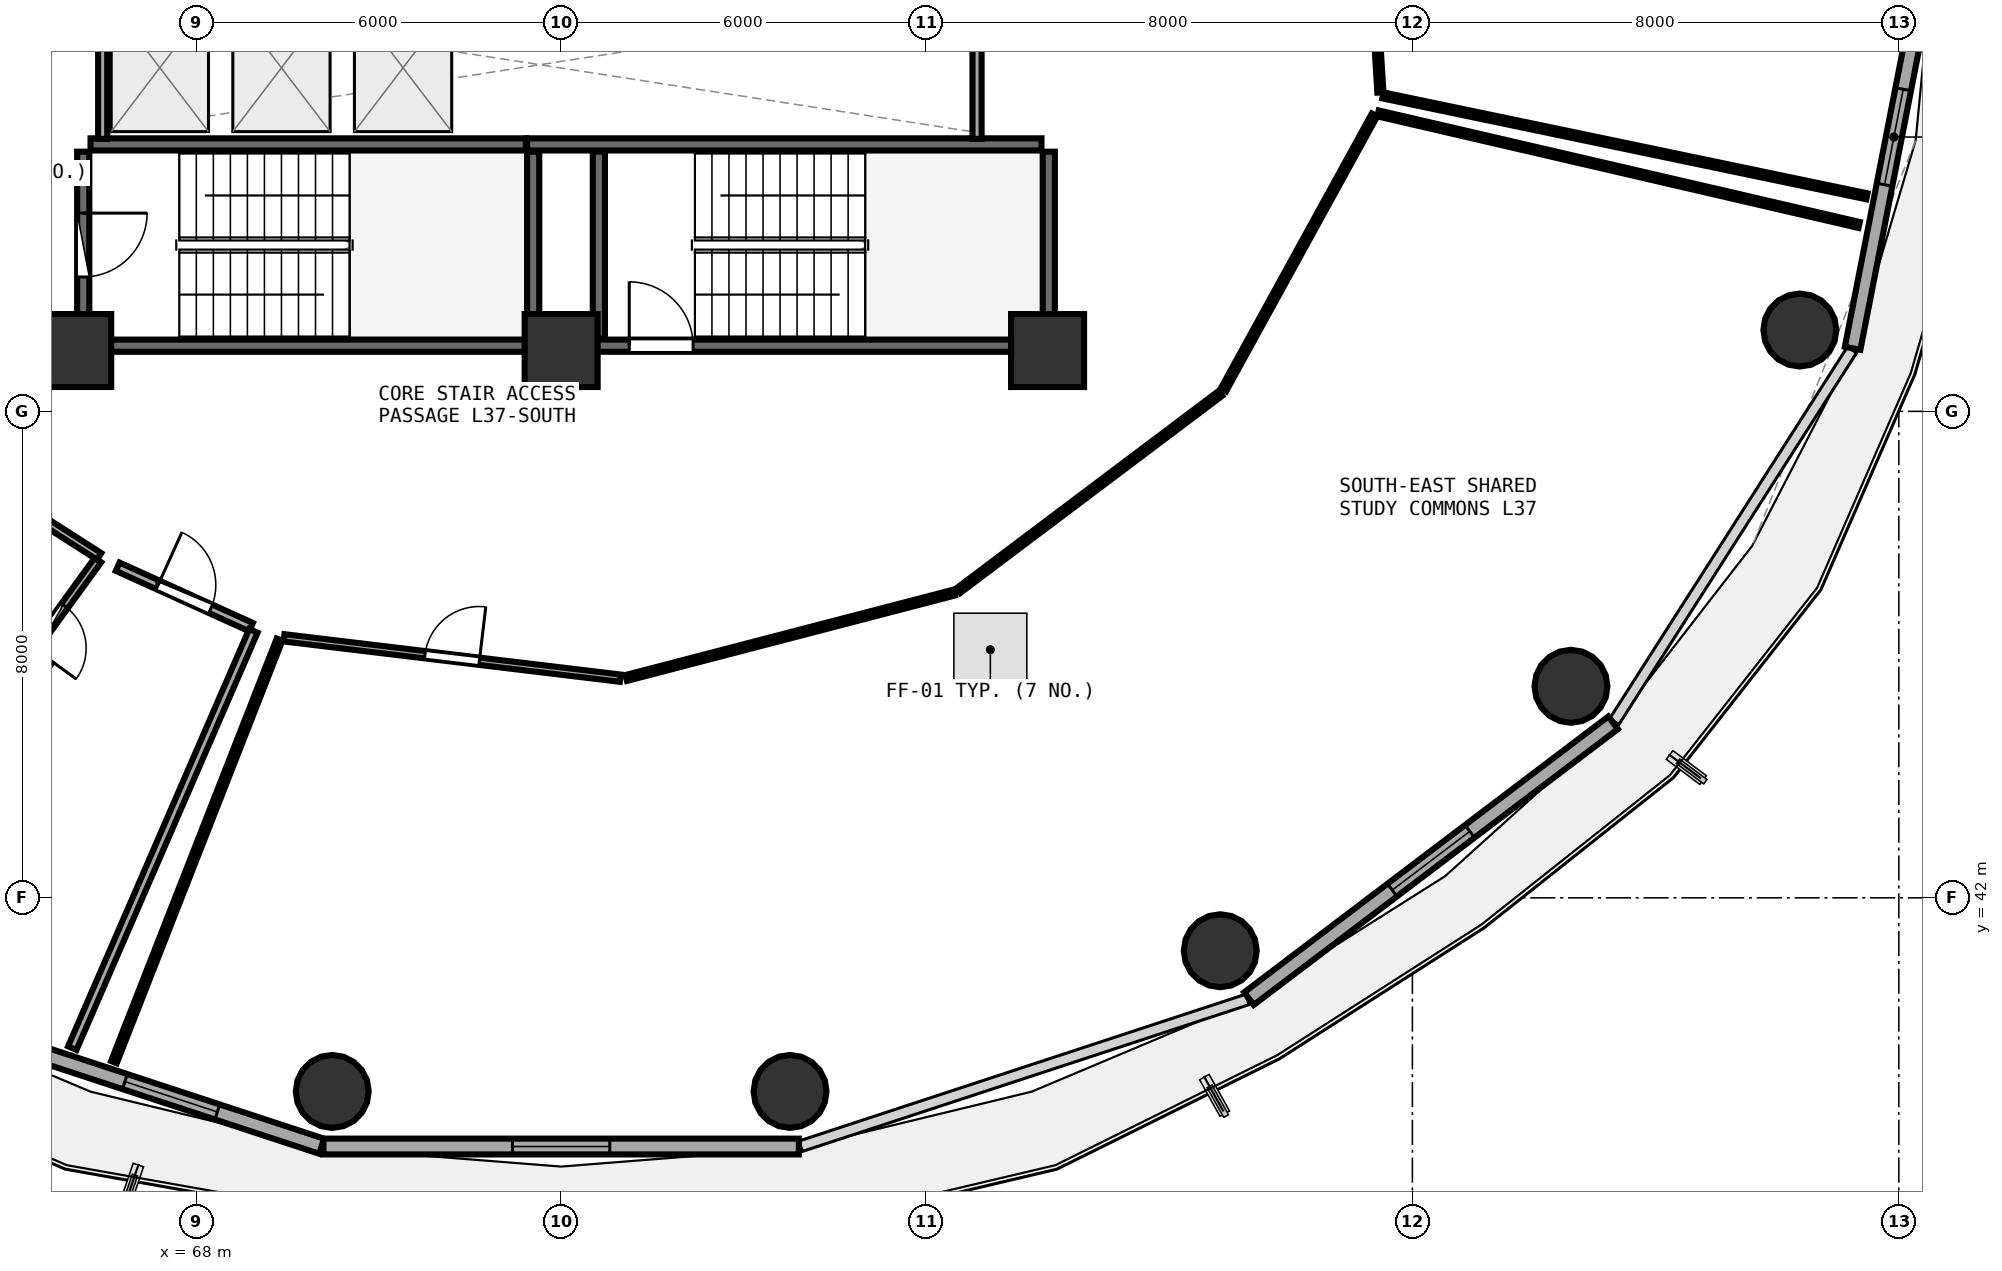
"""IFC4 building model, lengths in metres.
Left out: names, types, materials, properties, quantities, classifications, styles, units other than length and angle.
Written with IfcOpenShell. Run it as: python <this file> out.ifc"""

import sys

from ifc_helpers import new_model, si_unit, direction, frame, frame_2d, origin, origin_2d, place, context, subcontext, project, spatial, rectangle, circle, extrude, element, fill, save


model = new_model("IFC4")
c1 = context("Model", 3, precision=1e-05, world=origin(), true_north=direction((0.0, 1.0)))
c2 = subcontext(c1, "Body", "Model", "MODEL_VIEW")
j1 = project(units=[si_unit("LENGTHUNIT", "METRE"), si_unit("PLANEANGLEUNIT", "RADIAN")], contexts=[c1])
p1 = place(None, origin())
s1 = spatial("IfcSite", under=j1, at=p1, CompositionType="ELEMENT")
p2 = place(p1, origin())
s2 = spatial("IfcBuilding", under=s1, at=p2, CompositionType="ELEMENT")
p3 = place(p2, frame((0.0, 0.0, 146.85)))
s3 = spatial("IfcBuildingStorey", under=s2, at=p3, CompositionType="ELEMENT", Elevation=146.85)
for number, where, z_axis, x_axis in (
    (1, (66.0, 51.0, 0.0), (0.0, 0.0, 1.0), (1.0, 0.0, 0.0)),
    (2, (74.0, 51.0, 0.0), (0.0, 0.0, 1.0), (1.0, 0.0, 0.0)),
    (3, (82.0, 51.0, 0.0), (0.0, 0.0, 1.0), (1.0, 0.0, 0.0)),
):
    element("IfcColumn", number, at=place(p3, frame(where, z_axis=z_axis, x_axis=x_axis)), inside=s3, PredefinedType="PILASTER", context=c2, shape_type="SweptSolid", body=[
        extrude(rectangle(XDim=1.2, YDim=1.2, at=origin_2d()), origin(), (0.0, 0.0, 1.0), 3.75),
    ])
for number, where, z_axis, x_axis in (
    (4, (70.235, 38.816, 0.0), (0.0, 0.0, 1.0), (1.0, 0.0, 0.0)),
    (5, (77.765, 38.816, 0.0), (0.0, 0.0, 1.0), (1.0, 0.0, 0.0)),
    (6, (84.84, 41.13, 0.0), (0.0, 0.0, 1.0), (1.0, 0.0, 0.0)),
    (7, (90.608, 45.479, 0.0), (0.0, 0.0, 1.0), (1.0, 0.0, 0.0)),
    (8, (94.373, 51.337, 0.0), (0.0, 0.0, 1.0), (1.0, 0.0, 0.0)),
):
    element("IfcColumn", number, at=place(p3, frame(where, z_axis=z_axis, x_axis=x_axis)), inside=s3, PredefinedType="COLUMN", context=c2, shape_type="SweptSolid", body=[
        extrude(circle(Radius=0.6, at=origin_2d()), origin(), (0.0, 0.0, 1.0), 3.75),
    ])
p4 = place(p3, frame((62.714, 40.328, 0.0), z_axis=(0.0, 0.0, 1.0), x_axis=(0.950038302428, -0.312133343173, 0.0)))
e9 = element("IfcWall", 9, at=p4, inside=s3, PredefinedType="SOLIDWALL", context=c2, shape_type="SweptSolid", body=[
    extrude(rectangle(XDim=7.733, YDim=0.26, at=frame_2d((3.867, 0.0))), origin(), (0.0, 0.0, 1.0), 3.475),
])
p5 = place(p4, frame((4.327, 0.0, 0.85)))
e10 = element("IfcOpeningElement", 10, at=p5, cuts=e9, PredefinedType="OPENING", context=c2, shape_type="SweptSolid", body=[
    extrude(rectangle(XDim=1.6, YDim=1.45, at=frame_2d((0.8, 0.725))), frame((0.0, 0.14, 0.0), z_axis=(0.0, -1.0, 0.0), x_axis=(1.0, 0.0, 0.0)), (0.0, 0.0, 1.0), 0.28),
])
p6 = place(p3, frame((70.091, 37.91, 0.0), z_axis=(0.0, 0.0, 1.0), x_axis=(1.0, 0.0, 0.0)))
e11 = element("IfcWall", 11, at=p6, inside=s3, PredefinedType="SOLIDWALL", context=c2, shape_type="SweptSolid", body=[
    extrude(rectangle(XDim=7.819, YDim=0.26, at=frame_2d((3.909, 0.0))), origin(), (0.0, 0.0, 1.0), 3.475),
])
p7 = place(p6, frame((3.109, 0.0, 0.85)))
e12 = element("IfcOpeningElement", 12, at=p7, cuts=e11, PredefinedType="OPENING", context=c2, shape_type="SweptSolid", body=[
    extrude(rectangle(XDim=1.6, YDim=1.45, at=frame_2d((0.8, 0.725))), frame((0.0, 0.14, 0.0), z_axis=(0.0, -1.0, 0.0), x_axis=(1.0, 0.0, 0.0)), (0.0, 0.0, 1.0), 0.28),
])
p8 = place(p3, frame((85.312, 40.342, 0.0), z_axis=(0.0, 0.0, 1.0), x_axis=(0.797163719609, 0.603763202042, 0.0)))
e13 = element("IfcWall", 13, at=p8, inside=s3, PredefinedType="SOLIDWALL", context=c2, shape_type="SweptSolid", body=[
    extrude(rectangle(XDim=7.512, YDim=0.26, at=frame_2d((3.756, 0.0))), origin(), (0.0, 0.0, 1.0), 3.475),
])
p9 = place(p8, frame((2.956, 0.0, 0.85)))
e14 = element("IfcOpeningElement", 14, at=p9, cuts=e13, PredefinedType="OPENING", context=c2, shape_type="SweptSolid", body=[
    extrude(rectangle(XDim=1.6, YDim=1.45, at=frame_2d((0.8, 0.725))), frame((0.0, 0.14, 0.0), z_axis=(0.0, -1.0, 0.0), x_axis=(1.0, 0.0, 0.0)), (0.0, 0.0, 1.0), 0.28),
])
p10 = place(p3, frame((95.24, 51.038, 0.0), z_axis=(0.0, 0.0, 1.0), x_axis=(0.191716984769, 0.981450252306, 0.0)))
e15 = element("IfcWall", 15, at=p10, inside=s3, PredefinedType="SOLIDWALL", context=c2, shape_type="SweptSolid", body=[
    extrude(rectangle(XDim=7.079, YDim=0.26, at=frame_2d((3.54, 0.0))), origin(), (0.0, 0.0, 1.0), 3.475),
])
p11 = place(p10, frame((2.74, 0.0, 0.85)))
e16 = element("IfcOpeningElement", 16, at=p11, cuts=e15, PredefinedType="OPENING", context=c2, shape_type="SweptSolid", body=[
    extrude(rectangle(XDim=1.6, YDim=1.45, at=frame_2d((0.8, 0.725))), frame((0.0, 0.14, 0.0), z_axis=(0.0, -1.0, 0.0), x_axis=(1.0, 0.0, 0.0)), (0.0, 0.0, 1.0), 0.28),
])
p12 = place(p3, frame((74.0, 51.08, 0.0), z_axis=(0.0, 0.0, 1.0), x_axis=(1.0, 0.0, 0.0)))
e17 = element("IfcWall", 17, at=p12, inside=s3, PredefinedType="SHEAR", context=c2, shape_type="SweptSolid", body=[
    extrude(rectangle(XDim=7.9, YDim=0.2, at=frame_2d((3.95, 0.0))), origin(), (0.0, 0.0, 1.0), 3.49),
])
p13 = place(p12, frame((1.12, 0.0, 0.0)))
e18 = element("IfcOpeningElement", 18, at=p13, cuts=e17, PredefinedType="OPENING", context=c2, shape_type="SweptSolid", body=[
    extrude(rectangle(XDim=1.05, YDim=2.1, at=frame_2d((0.525, 1.05))), frame((0.0, 0.11, 0.0), z_axis=(0.0, -1.0, 0.0), x_axis=(1.0, 0.0, 0.0)), (0.0, 0.0, 1.0), 0.22),
])
p14 = place(p3, frame((82.02, 51.2, 0.0), z_axis=(0.0, 0.0, 1.0), x_axis=(0.0, 1.0, 0.0)))
e19 = element("IfcWall", 19, at=p14, inside=s3, PredefinedType="SHEAR", context=c2, shape_type="SweptSolid", body=[
    extrude(rectangle(XDim=3.07, YDim=0.2, at=frame_2d((1.535, 0.0))), origin(), (0.0, 0.0, 1.0), 3.49),
])
p15 = place(p3, frame((81.9, 54.39, 0.0), z_axis=(0.0, 0.0, 1.0), x_axis=(-1.0, 0.0, 0.0)))
e20 = element("IfcWall", 20, at=p15, inside=s3, PredefinedType="SHEAR", context=c2, shape_type="SweptSolid", body=[
    extrude(rectangle(XDim=8.46, YDim=0.2, at=frame_2d((4.23, 0.0))), origin(), (0.0, 0.0, 1.0), 3.49),
])
p16 = place(p3, frame((74.62, 54.27, 0.0), z_axis=(0.0, 0.0, 1.0), x_axis=(0.0, -1.0, 0.0)))
e21 = element("IfcWall", 21, at=p16, inside=s3, PredefinedType="SHEAR", context=c2, shape_type="SweptSolid", body=[
    extrude(rectangle(XDim=3.07, YDim=0.2, at=frame_2d((1.535, 0.0))), origin(), (0.0, 0.0, 1.0), 3.49),
])
p17 = place(p3, frame((66.26, 51.08, 0.0), z_axis=(0.0, 0.0, 1.0), x_axis=(1.0, 0.0, 0.0)))
e22 = element("IfcWall", 22, at=p17, inside=s3, PredefinedType="SHEAR", context=c2, shape_type="SweptSolid", body=[
    extrude(rectangle(XDim=7.16, YDim=0.2, at=frame_2d((3.58, 0.0))), origin(), (0.0, 0.0, 1.0), 3.49),
])
p18 = place(p3, frame((73.54, 51.2, 0.0), z_axis=(0.0, 0.0, 1.0), x_axis=(0.0, 1.0, 0.0)))
e23 = element("IfcWall", 23, at=p18, inside=s3, PredefinedType="SHEAR", context=c2, shape_type="SweptSolid", body=[
    extrude(rectangle(XDim=3.07, YDim=0.2, at=frame_2d((1.535, 0.0))), origin(), (0.0, 0.0, 1.0), 3.49),
])
p19 = place(p3, frame((73.42, 54.39, 0.0), z_axis=(0.0, 0.0, 1.0), x_axis=(-1.0, 0.0, 0.0)))
e24 = element("IfcWall", 24, at=p19, inside=s3, PredefinedType="SHEAR", context=c2, shape_type="SweptSolid", body=[
    extrude(rectangle(XDim=7.16, YDim=0.2, at=frame_2d((3.58, 0.0))), origin(), (0.0, 0.0, 1.0), 3.49),
])
p20 = place(p3, frame((66.14, 54.27, 0.0), z_axis=(0.0, 0.0, 1.0), x_axis=(0.0, -1.0, 0.0)))
e25 = element("IfcWall", 25, at=p20, inside=s3, PredefinedType="SHEAR", context=c2, shape_type="SweptSolid", body=[
    extrude(rectangle(XDim=3.07, YDim=0.2, at=frame_2d((1.535, 0.0))), origin(), (0.0, 0.0, 1.0), 3.49),
])
p21 = place(p20, frame((1.01, 0.0, 0.0)))
e26 = element("IfcOpeningElement", 26, at=p21, cuts=e25, PredefinedType="OPENING", context=c2, shape_type="SweptSolid", body=[
    extrude(rectangle(XDim=1.05, YDim=2.1, at=frame_2d((0.525, 1.05))), frame((0.0, 0.11, 0.0), z_axis=(0.0, -1.0, 0.0), x_axis=(1.0, 0.0, 0.0)), (0.0, 0.0, 1.0), 0.22),
])
for number, where, z_axis, x_axis in (
    (27, (66.46, 54.48, 0.0), (0.0, 0.0, 1.0), (0.0, 1.0, 0.0)),
    (28, (80.84, 54.48, 0.0), (0.0, 0.0, 1.0), (0.0, 1.0, 0.0)),
):
    element("IfcWall", number, at=place(p3, frame(where, z_axis=z_axis, x_axis=x_axis)), inside=s3, PredefinedType="PARTITIONING", context=c2, shape_type="SweptSolid", body=[
        extrude(rectangle(XDim=2.29, YDim=0.15, at=frame_2d((1.145, 0.0))), origin(), (0.0, 0.0, 1.0), 3.48),
    ])
p22 = place(p3, frame((69.443, 46.276, 0.0), z_axis=(0.0, 0.0, 1.0), x_axis=(0.992874348748, -0.119165966612, 0.0)))
e29 = element("IfcWall", 29, at=p22, inside=s3, PredefinedType="PARTITIONING", context=c2, shape_type="SweptSolid", body=[
    extrude(rectangle(XDim=5.569, YDim=0.12, at=frame_2d((2.784, 0.0))), origin(), (0.0, 0.0, 1.0), 2.975),
])
p23 = place(p22, frame((2.334, 0.0, 0.0)))
e30 = element("IfcOpeningElement", 30, at=p23, cuts=e29, PredefinedType="OPENING", context=c2, shape_type="SweptSolid", body=[
    extrude(rectangle(XDim=0.9, YDim=2.08, at=frame_2d((0.45, 1.04))), frame((0.0, 0.07, 0.0), z_axis=(0.0, -1.0, 0.0), x_axis=(1.0, 0.0, 0.0)), (0.0, 0.0, 1.0), 0.14),
])
p24 = place(p3, frame((66.383, 47.555, 0.0), z_axis=(0.0, 0.0, 1.0), x_axis=(-0.588001344837, -0.808859949849, 0.0)))
e31 = element("IfcWall", 31, at=p24, inside=s3, PredefinedType="PLUMBINGWALL", context=c2, shape_type="SweptSolid", body=[
    extrude(rectangle(XDim=2.727, YDim=0.13, at=frame_2d((1.364, 0.0))), origin(), (0.0, 0.0, 1.0), 3.235),
])
p25 = place(p24, frame((0.934, 0.0, 0.0)))
e32 = element("IfcOpeningElement", 32, at=p25, cuts=e31, PredefinedType="OPENING", context=c2, shape_type="SweptSolid", body=[
    extrude(rectangle(XDim=0.86, YDim=2.05, at=frame_2d((0.43, 1.025))), frame((0.0, 0.075, 0.0), z_axis=(0.0, -1.0, 0.0), x_axis=(1.0, 0.0, 0.0)), (0.0, 0.0, 1.0), 0.15),
])
p26 = place(p3, frame((66.707, 47.445, 0.0), z_axis=(0.0, 0.0, 1.0), x_axis=(0.910872904928, -0.412686989216, 0.0)))
e33 = element("IfcWall", 33, at=p26, inside=s3, PredefinedType="PARTITIONING", context=c2, shape_type="SweptSolid", body=[
    extrude(rectangle(XDim=2.407, YDim=0.15, at=frame_2d((1.204, 0.0))), origin(), (0.0, 0.0, 1.0), 3.235),
])
p27 = place(p26, frame((0.729, 0.0, 0.0)))
e34 = element("IfcOpeningElement", 34, at=p27, cuts=e33, PredefinedType="OPENING", context=c2, shape_type="SweptSolid", body=[
    extrude(rectangle(XDim=0.95, YDim=2.08, at=frame_2d((0.475, 1.04))), frame((0.0, 0.085, 0.0), z_axis=(0.0, -1.0, 0.0), x_axis=(1.0, 0.0, 0.0)), (0.0, 0.0, 1.0), 0.17),
])
p28 = place(p3, frame((75.07, 45.615, 0.0), z_axis=(0.0, 0.0, 1.0), x_axis=(0.967718115259, 0.252035016216, 0.0)))
e35 = element("IfcWall", 35, at=p28, inside=s3, PredefinedType="PARTITIONING", context=c2, shape_type="SweptSolid", body=[
    extrude(rectangle(XDim=5.575, YDim=0.1, at=frame_2d((2.787, 0.0))), origin(), (0.0, 0.0, 1.0), 2.975),
])
p29 = place(p3, frame((80.535, 47.054, 0.0), z_axis=(0.0, 0.0, 1.0), x_axis=(0.799096406603, 0.601202904979, 0.0)))
e36 = element("IfcWall", 36, at=p29, inside=s3, PredefinedType="PARTITIONING", context=c2, shape_type="SweptSolid", body=[
    extrude(rectangle(XDim=5.387, YDim=0.1, at=frame_2d((2.694, 0.0))), origin(), (0.0, 0.0, 1.0), 2.975),
])
p30 = place(p3, frame((84.891, 50.352, 0.0), z_axis=(0.0, 0.0, 1.0), x_axis=(0.481680787808, 0.876346745676, 0.0)))
e37 = element("IfcWall", 37, at=p30, inside=s3, PredefinedType="PARTITIONING", context=c2, shape_type="SweptSolid", body=[
    extrude(rectangle(XDim=5.16, YDim=0.1, at=frame_2d((2.58, 0.0))), origin(), (0.0, 0.0, 1.0), 2.975),
])
p31 = place(p3, frame((87.435, 54.9, 0.0), z_axis=(0.0, 0.0, 1.0), x_axis=(0.97414388338, -0.225928516292, 0.0)))
e38 = element("IfcWall", 38, at=p31, inside=s3, PredefinedType="PARTITIONING", context=c2, shape_type="SweptSolid", body=[
    extrude(rectangle(XDim=8.122, YDim=0.1, at=frame_2d((4.061, 0.0))), origin(), (0.0, 0.0, 1.0), 3.025),
])
p32 = place(p3, frame((66.645, 39.297, 0.0), z_axis=(0.0, 0.0, 1.0), x_axis=(0.364957999702, 0.931023983823, 0.0)))
e39 = element("IfcWall", 39, at=p32, inside=s3, PredefinedType="PARTITIONING", context=c2, shape_type="SweptSolid", body=[
    extrude(rectangle(XDim=7.464, YDim=0.1, at=frame_2d((3.732, 0.0))), origin(), (0.0, 0.0, 1.0), 3.025),
])
p33 = place(p3, frame((87.474, 55.244, 0.0), z_axis=(0.0, 0.0, 1.0), x_axis=(-0.060688331813, 0.998156764432, 0.0)))
e40 = element("IfcWall", 40, at=p33, inside=s3, PredefinedType="PARTITIONING", context=c2, shape_type="SweptSolid", body=[
    extrude(rectangle(XDim=6.827, YDim=0.1, at=frame_2d((3.414, 0.0))), origin(), (0.0, 0.0, 1.0), 2.975),
])
p34 = place(p3, frame((95.475, 53.536, 0.0), z_axis=(0.0, 0.0, 1.0), x_axis=(-0.978946183013, 0.204118521367, 0.0)))
e41 = element("IfcWall", 41, at=p34, inside=s3, PredefinedType="PARTITIONING", context=c2, shape_type="SweptSolid", body=[
    extrude(rectangle(XDim=8.131, YDim=0.1, at=frame_2d((4.065, 0.0))), origin(), (0.0, 0.0, 1.0), 3.025),
])
p35 = place(p3, frame((65.573, 48.145, 0.0), z_axis=(0.0, 0.0, 1.0), x_axis=(0.842104586495, -0.539314254776, 0.0)))
e42 = element("IfcWall", 42, at=p35, inside=s3, PredefinedType="PLUMBINGWALL", context=c2, shape_type="SweptSolid", body=[
    extrude(rectangle(XDim=0.984, YDim=0.13, at=frame_2d((0.492, 0.0))), origin(), (0.0, 0.0, 1.0), 3.48),
])
p36 = place(p3, frame((68.938, 46.39, 0.0), z_axis=(0.0, 0.0, 1.0), x_axis=(-0.398074464123, -0.917353105959, 0.0)))
e43 = element("IfcWall", 43, at=p36, inside=s3, PredefinedType="PARTITIONING", context=c2, shape_type="SweptSolid", body=[
    extrude(rectangle(XDim=7.481, YDim=0.15, at=frame_2d((3.741, 0.0))), origin(), (0.0, 0.0, 1.0), 3.025),
])
p37 = place(p5, origin())
e44 = element("IfcWindow", 44, at=p37, inside=s3, PartitioningType="SINGLE_PANEL", PredefinedType="WINDOW", context=c2, shape_type="SweptSolid", body=[
    extrude(rectangle(XDim=1.6, YDim=1.45, at=frame_2d((0.8, 0.725))), frame((0.0, 0.03, 0.0), z_axis=(0.0, -1.0, 0.0), x_axis=(1.0, 0.0, 0.0)), (0.0, 0.0, 1.0), 0.06),
])
fill(e10, e44)
p38 = place(p7, origin())
e45 = element("IfcWindow", 45, at=p38, inside=s3, PartitioningType="SINGLE_PANEL", PredefinedType="WINDOW", context=c2, shape_type="SweptSolid", body=[
    extrude(rectangle(XDim=1.6, YDim=1.45, at=frame_2d((0.8, 0.725))), frame((0.0, 0.03, 0.0), z_axis=(0.0, -1.0, 0.0), x_axis=(1.0, 0.0, 0.0)), (0.0, 0.0, 1.0), 0.06),
])
fill(e12, e45)
p39 = place(p9, origin())
e46 = element("IfcWindow", 46, at=p39, inside=s3, PartitioningType="SINGLE_PANEL", PredefinedType="WINDOW", context=c2, shape_type="SweptSolid", body=[
    extrude(rectangle(XDim=1.6, YDim=1.45, at=frame_2d((0.8, 0.725))), frame((0.0, 0.03, 0.0), z_axis=(0.0, -1.0, 0.0), x_axis=(1.0, 0.0, 0.0)), (0.0, 0.0, 1.0), 0.06),
])
fill(e14, e46)
p40 = place(p11, origin())
e47 = element("IfcWindow", 47, at=p40, inside=s3, PartitioningType="SINGLE_PANEL", PredefinedType="WINDOW", context=c2, shape_type="SweptSolid", body=[
    extrude(rectangle(XDim=1.6, YDim=1.45, at=frame_2d((0.8, 0.725))), frame((0.0, 0.03, 0.0), z_axis=(0.0, -1.0, 0.0), x_axis=(1.0, 0.0, 0.0)), (0.0, 0.0, 1.0), 0.06),
])
fill(e16, e47)
p41 = place(p13, origin())
e48 = element("IfcDoor", 48, at=p41, inside=s3, OperationType="SINGLE_SWING_LEFT", PredefinedType="DOOR", context=c2, shape_type="SweptSolid", body=[
    extrude(rectangle(XDim=1.05, YDim=2.1, at=frame_2d((0.525, 1.05))), frame((0.0, 0.025, 0.0), z_axis=(0.0, -1.0, 0.0), x_axis=(1.0, 0.0, 0.0)), (0.0, 0.0, 1.0), 0.05),
])
fill(e18, e48)
p42 = place(p21, origin())
e49 = element("IfcDoor", 49, at=p42, inside=s3, OperationType="SINGLE_SWING_LEFT", PredefinedType="DOOR", context=c2, shape_type="SweptSolid", body=[
    extrude(rectangle(XDim=1.05, YDim=2.1, at=frame_2d((0.525, 1.05))), frame((0.0, 0.025, 0.0), z_axis=(0.0, -1.0, 0.0), x_axis=(1.0, 0.0, 0.0)), (0.0, 0.0, 1.0), 0.05),
])
fill(e26, e49)
p43 = place(p23, origin())
e50 = element("IfcDoor", 50, at=p43, inside=s3, OperationType="SINGLE_SWING_RIGHT", PredefinedType="DOOR", context=c2, shape_type="SweptSolid", body=[
    extrude(rectangle(XDim=0.9, YDim=2.08, at=frame_2d((0.45, 1.04))), frame((0.0, 0.025, 0.0), z_axis=(0.0, -1.0, 0.0), x_axis=(1.0, 0.0, 0.0)), (0.0, 0.0, 1.0), 0.05),
])
fill(e30, e50)
p44 = place(p25, origin())
e51 = element("IfcDoor", 51, at=p44, inside=s3, OperationType="SINGLE_SWING_RIGHT", PredefinedType="DOOR", context=c2, shape_type="SweptSolid", body=[
    extrude(rectangle(XDim=0.86, YDim=2.05, at=frame_2d((0.43, 1.025))), frame((0.0, 0.025, 0.0), z_axis=(0.0, -1.0, 0.0), x_axis=(1.0, 0.0, 0.0)), (0.0, 0.0, 1.0), 0.05),
])
fill(e32, e51)
p45 = place(p27, origin())
e52 = element("IfcDoor", 52, at=p45, inside=s3, OperationType="SINGLE_SWING_LEFT", PredefinedType="DOOR", context=c2, shape_type="SweptSolid", body=[
    extrude(rectangle(XDim=0.95, YDim=2.08, at=frame_2d((0.475, 1.04))), frame((0.0, 0.025, 0.0), z_axis=(0.0, -1.0, 0.0), x_axis=(1.0, 0.0, 0.0)), (0.0, 0.0, 1.0), 0.05),
])
fill(e34, e52)
save(model, sys.argv[1])
